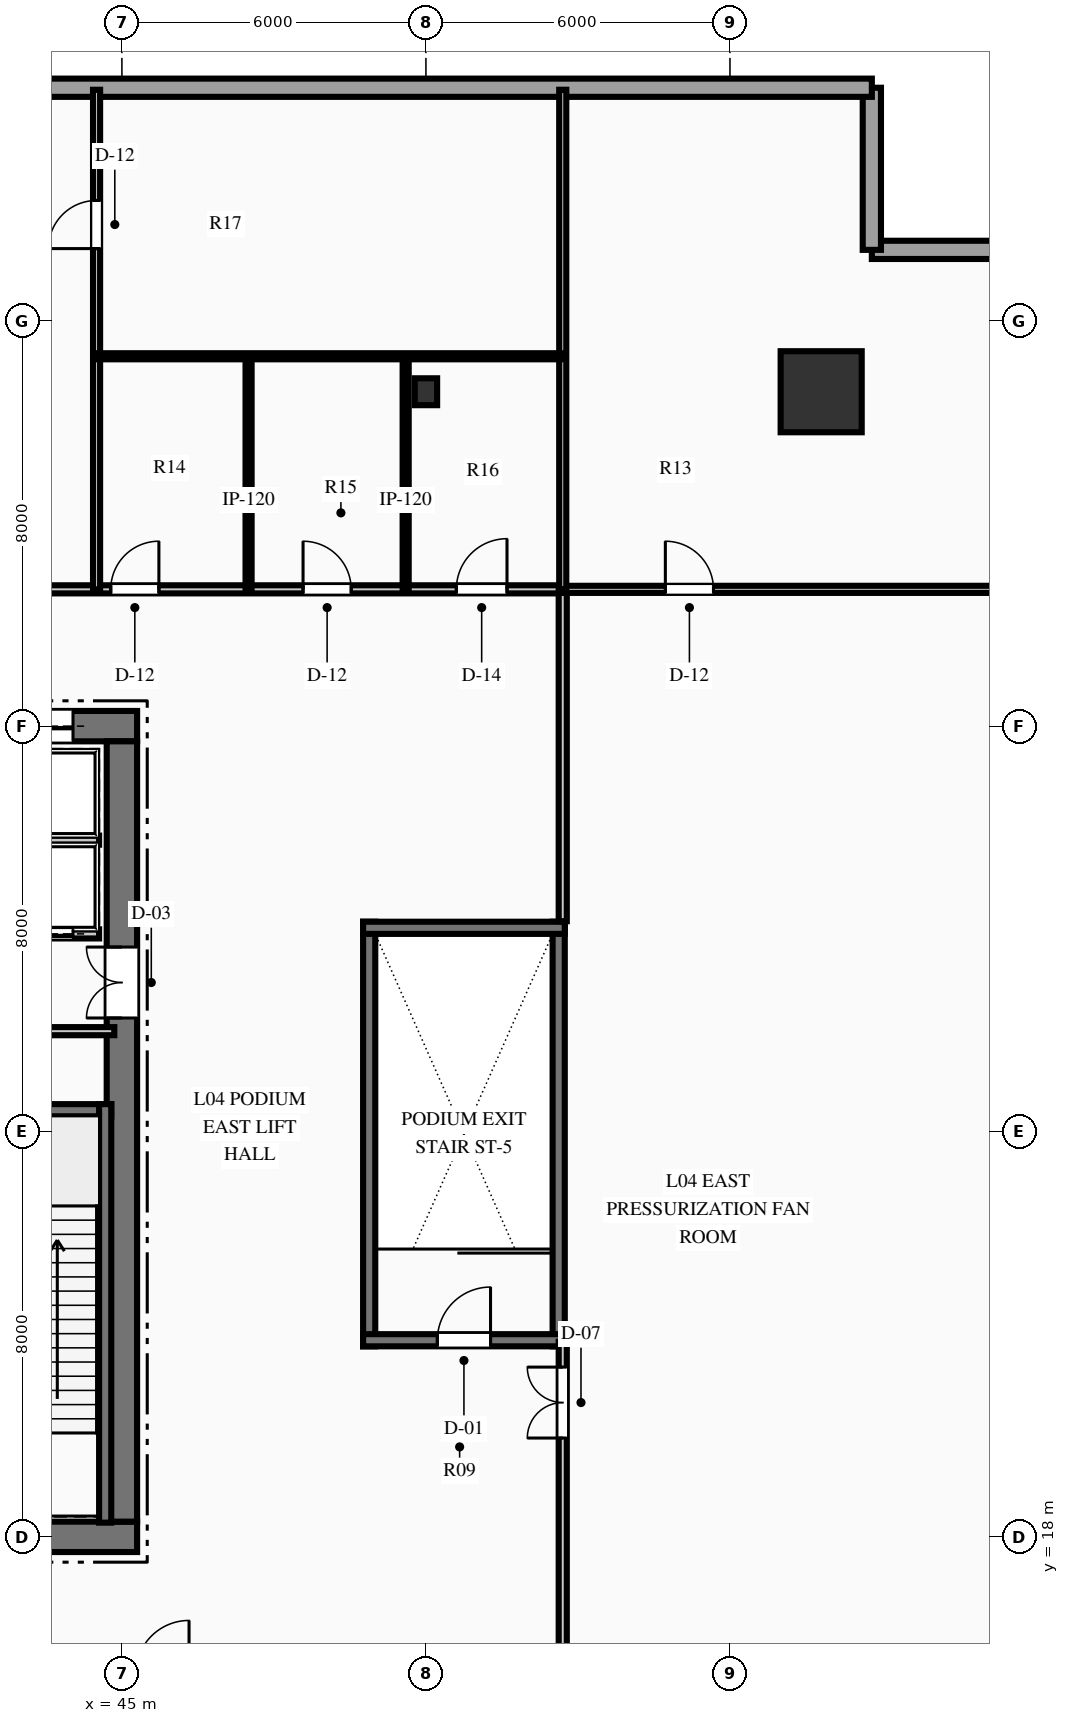
"""IFC4 building model, lengths in metres.
Left out: names, types, materials, properties, quantities, classifications, styles, units other than length and angle.
Written with IfcOpenShell. Run it as: python <this file> out.ifc"""

import sys

from ifc_helpers import new_model, si_unit, direction, frame, frame_2d, origin, origin_2d, place, context, subcontext, project, spatial, rectangle, hollow_rectangle, i_section, extrude, element, fill, save


model = new_model("IFC4")
c1 = context("Model", 3, precision=1e-05, world=origin(), true_north=direction((0.0, 1.0)))
c2 = subcontext(c1, "Body", "Model", "MODEL_VIEW")
j1 = project(units=[si_unit("LENGTHUNIT", "METRE"), si_unit("PLANEANGLEUNIT", "RADIAN")], contexts=[c1])
p1 = place(None, origin())
s1 = spatial("IfcSite", under=j1, at=p1, CompositionType="ELEMENT")
p2 = place(p1, origin())
s2 = spatial("IfcBuilding", under=s1, at=p2, CompositionType="ELEMENT")
p3 = place(p2, frame((0.0, 0.0, 22.2)))
s3 = spatial("IfcBuildingStorey", under=s2, at=p3, CompositionType="ELEMENT", Elevation=22.2)
p4 = place(p3, frame((26.7, 18.0, 0.0), z_axis=(0.0, 0.0, 1.0), x_axis=(1.0, 0.0, 0.0)))
e1 = element("IfcWall", 1, at=p4, inside=s3, PredefinedType="SHEAR", context=c2, shape_type="SweptSolid", body=[
    extrude(rectangle(XDim=18.6, YDim=0.6, at=frame_2d((9.3, 0.0))), origin(), (0.0, 0.0, 1.0), 6.0),
])
p5 = place(p4, frame((7.4, 0.0, 0.0)))
e2 = element("IfcOpeningElement", 2, at=p5, cuts=e1, PredefinedType="OPENING", context=c2, shape_type="SweptSolid", body=[
    extrude(rectangle(XDim=1.1, YDim=2.15, at=frame_2d((0.55, 1.075))), frame((0.0, 0.31, 0.0), z_axis=(0.0, -1.0, 0.0), x_axis=(1.0, 0.0, 0.0)), (0.0, 0.0, 1.0), 0.62),
])
p6 = place(p4, frame((9.58, 0.0, 0.0)))
e3 = element("IfcOpeningElement", 3, at=p6, cuts=e1, PredefinedType="OPENING", context=c2, shape_type="SweptSolid", body=[
    extrude(rectangle(XDim=1.1, YDim=2.15, at=frame_2d((0.55, 1.075))), frame((0.0, 0.31, 0.0), z_axis=(0.0, -1.0, 0.0), x_axis=(1.0, 0.0, 0.0)), (0.0, 0.0, 1.0), 0.62),
])
p7 = place(p3, frame((26.7, 34.0, 0.0), z_axis=(0.0, 0.0, 1.0), x_axis=(1.0, 0.0, 0.0)))
e4 = element("IfcWall", 4, at=p7, inside=s3, PredefinedType="SHEAR", context=c2, shape_type="SweptSolid", body=[
    extrude(rectangle(XDim=18.6, YDim=0.6, at=frame_2d((9.3, 0.0))), origin(), (0.0, 0.0, 1.0), 6.0),
])
p8 = place(p7, frame((1.265, 0.0, 0.0)))
e5 = element("IfcOpeningElement", 5, at=p8, cuts=e4, PredefinedType="OPENING", context=c2, shape_type="SweptSolid", body=[
    extrude(rectangle(XDim=1.1, YDim=2.15, at=frame_2d((0.55, 1.075))), frame((0.0, 0.31, 0.0), z_axis=(0.0, -1.0, 0.0), x_axis=(1.0, 0.0, 0.0)), (0.0, 0.0, 1.0), 0.62),
])
p9 = place(p7, frame((3.515, 0.0, 0.0)))
e6 = element("IfcOpeningElement", 6, at=p9, cuts=e4, PredefinedType="OPENING", context=c2, shape_type="SweptSolid", body=[
    extrude(rectangle(XDim=1.1, YDim=2.15, at=frame_2d((0.55, 1.075))), frame((0.0, 0.31, 0.0), z_axis=(0.0, -1.0, 0.0), x_axis=(1.0, 0.0, 0.0)), (0.0, 0.0, 1.0), 0.62),
])
p10 = place(p7, frame((13.985, 0.0, 0.0)))
e7 = element("IfcOpeningElement", 7, at=p10, cuts=e4, PredefinedType="OPENING", context=c2, shape_type="SweptSolid", body=[
    extrude(rectangle(XDim=1.1, YDim=2.15, at=frame_2d((0.55, 1.075))), frame((0.0, 0.31, 0.0), z_axis=(0.0, -1.0, 0.0), x_axis=(1.0, 0.0, 0.0)), (0.0, 0.0, 1.0), 0.62),
])
p11 = place(p7, frame((16.235, 0.0, 0.0)))
e8 = element("IfcOpeningElement", 8, at=p11, cuts=e4, PredefinedType="OPENING", context=c2, shape_type="SweptSolid", body=[
    extrude(rectangle(XDim=1.1, YDim=2.15, at=frame_2d((0.55, 1.075))), frame((0.0, 0.31, 0.0), z_axis=(0.0, -1.0, 0.0), x_axis=(1.0, 0.0, 0.0)), (0.0, 0.0, 1.0), 0.62),
])
p12 = place(p3, frame((45.0, 18.3, 0.0), z_axis=(0.0, 0.0, 1.0), x_axis=(0.0, 1.0, 0.0)))
e9 = element("IfcWall", 9, at=p12, inside=s3, PredefinedType="SHEAR", context=c2, shape_type="SweptSolid", body=[
    extrude(rectangle(XDim=15.4, YDim=0.6, at=frame_2d((7.7, 0.0))), origin(), (0.0, 0.0, 1.0), 6.0),
])
p13 = place(p12, frame((9.94, 0.0, 0.0)))
e10 = element("IfcOpeningElement", 10, at=p13, cuts=e9, PredefinedType="OPENING", context=c2, shape_type="SweptSolid", body=[
    extrude(rectangle(XDim=1.4, YDim=2.2, at=frame_2d((0.7, 1.1))), frame((0.0, 0.31, 0.0), z_axis=(0.0, -1.0, 0.0), x_axis=(1.0, 0.0, 0.0)), (0.0, 0.0, 1.0), 0.62),
])
p14 = place(p3, frame((40.81, 26.42, 0.0), z_axis=(0.0, 0.0, 1.0), x_axis=(1.0, 0.0, 0.0)))
e11 = element("IfcWall", 11, at=p14, inside=s3, PredefinedType="SHEAR", context=c2, shape_type="SweptSolid", body=[
    extrude(rectangle(XDim=3.98, YDim=0.24, at=frame_2d((1.99, 0.0))), origin(), (0.0, 0.0, 1.0), 6.0),
])
p15 = place(p3, frame((44.67, 18.28, 0.0), z_axis=(0.0, 0.0, 1.0), x_axis=(0.0, 1.0, 0.0)))
e12 = element("IfcWall", 12, at=p15, inside=s3, PredefinedType="SHEAR", context=c2, shape_type="SweptSolid", body=[
    extrude(rectangle(XDim=8.26, YDim=0.24, at=frame_2d((4.13, 0.0))), origin(), (0.0, 0.0, 1.0), 6.0),
])
for number, where, z_axis, x_axis in (
    (13, (49.88, 21.76, 0.0), (0.0, 0.0, 1.0), (0.0, 1.0, 0.0)),
    (14, (53.62, 21.76, 0.0), (0.0, 0.0, 1.0), (0.0, 1.0, 0.0)),
):
    element("IfcWall", number, at=place(p3, frame(where, z_axis=z_axis, x_axis=x_axis)), inside=s3, PredefinedType="SHEAR", context=c2, shape_type="SweptSolid", body=[
        extrude(rectangle(XDim=8.38, YDim=0.24, at=frame_2d((4.19, 0.0))), origin(), (0.0, 0.0, 1.0), 6.0),
    ])
p16 = place(p3, frame((49.76, 21.88, 0.0), z_axis=(0.0, 0.0, 1.0), x_axis=(1.0, 0.0, 0.0)))
e15 = element("IfcWall", 15, at=p16, inside=s3, PredefinedType="SHEAR", context=c2, shape_type="SweptSolid", body=[
    extrude(rectangle(XDim=3.98, YDim=0.24, at=frame_2d((1.99, 0.0))), origin(), (0.0, 0.0, 1.0), 6.0),
])
p17 = place(p16, frame((1.465, 0.0, 0.0)))
e16 = element("IfcOpeningElement", 16, at=p17, cuts=e15, PredefinedType="OPENING", context=c2, shape_type="SweptSolid", body=[
    extrude(rectangle(XDim=1.05, YDim=2.15, at=frame_2d((0.525, 1.075))), frame((0.0, 0.13, 0.0), z_axis=(0.0, -1.0, 0.0), x_axis=(1.0, 0.0, 0.0)), (0.0, 0.0, 1.0), 0.26),
])
p18 = place(p3, frame((49.76, 30.02, 0.0), z_axis=(0.0, 0.0, 1.0), x_axis=(1.0, 0.0, 0.0)))
e17 = element("IfcWall", 17, at=p18, inside=s3, PredefinedType="SHEAR", context=c2, shape_type="SweptSolid", body=[
    extrude(rectangle(XDim=3.98, YDim=0.24, at=frame_2d((1.99, 0.0))), origin(), (0.0, 0.0, 1.0), 6.0),
])
p19 = place(p3, frame((58.8, 40.6, 0.0), z_axis=(0.0, 0.0, 1.0), x_axis=(1.0, 0.0, 0.0)))
e18 = element("IfcColumn", 18, at=p19, inside=s3, PredefinedType="COLUMN", context=c2, shape_type="SweptSolid", body=[
    extrude(hollow_rectangle(XDim=1.6, YDim=1.6, WallThickness=0.08, at=origin_2d()), origin(), (0.0, 0.0, 1.0), 6.0),
])
p20 = place(p3, frame((51.0, 40.6, 0.0), z_axis=(0.0, 0.0, 1.0), x_axis=(1.0, 0.0, 0.0)))
e19 = element("IfcColumn", 19, at=p20, inside=s3, PredefinedType="COLUMN", context=c2, shape_type="SweptSolid", body=[
    extrude(i_section(OverallWidth=0.442, OverallDepth=0.531, WebThickness=0.066, FlangeThickness=0.106, at=origin_2d()), origin(), (0.0, 0.0, 1.0), 6.0),
])
p21 = place(p3, frame((59.8, 43.4, 0.0), z_axis=(0.0, 0.0, 1.0), x_axis=(1.0, 0.0, 0.0)))
e20 = element("IfcWall", 20, at=p21, inside=s3, PredefinedType="STANDARD", context=c2, shape_type="SweptSolid", body=[
    extrude(rectangle(XDim=3.2, YDim=0.36, at=frame_2d((1.6, 0.0))), origin(), (0.0, 0.0, 1.0), 5.59),
])
p22 = place(p3, frame((59.8, 46.6, 0.0), z_axis=(0.0, 0.0, 1.0), x_axis=(0.0, -1.0, 0.0)))
e21 = element("IfcWall", 21, at=p22, inside=s3, PredefinedType="STANDARD", context=c2, shape_type="SweptSolid", body=[
    extrude(rectangle(XDim=3.2, YDim=0.36, at=frame_2d((1.6, 0.0))), origin(), (0.0, 0.0, 1.0), 5.59),
])
p23 = place(p3, frame((12.2, 46.6, 0.0), z_axis=(0.0, 0.0, 1.0), x_axis=(1.0, 0.0, 0.0)))
e22 = element("IfcWall", 22, at=p23, inside=s3, PredefinedType="STANDARD", context=c2, shape_type="SweptSolid", body=[
    extrude(rectangle(XDim=47.6, YDim=0.36, at=frame_2d((23.8, 0.0))), origin(), (0.0, 0.0, 1.0), 5.59),
])
p24 = place(p3, frame((40.8, 27.98, 0.0), z_axis=(0.0, 0.0, 1.0), x_axis=(1.0, 0.0, 0.0)))
e23 = element("IfcWall", 23, at=p24, inside=s3, PredefinedType="PARTITIONING", context=c2, shape_type="SweptSolid", body=[
    extrude(rectangle(XDim=4.05, YDim=0.16, at=frame_2d((2.025, 0.0))), origin(), (0.0, 0.0, 1.0), 5.59),
])
p25 = place(p24, frame((1.475, 0.0, 0.0)))
e24 = element("IfcOpeningElement", 24, at=p25, cuts=e23, PredefinedType="OPENING", context=c2, shape_type="SweptSolid", body=[
    extrude(rectangle(XDim=0.95, YDim=2.15, at=frame_2d((0.475, 1.075))), frame((0.0, 0.09, 0.0), z_axis=(0.0, -1.0, 0.0), x_axis=(1.0, 0.0, 0.0)), (0.0, 0.0, 1.0), 0.18),
])
p26 = place(p3, frame((40.12, 29.9, 0.0), z_axis=(0.0, 0.0, 1.0), x_axis=(1.0, 0.0, 0.0)))
e25 = element("IfcWall", 25, at=p26, inside=s3, PredefinedType="PARTITIONING", context=c2, shape_type="SweptSolid", body=[
    extrude(rectangle(XDim=4.43, YDim=0.18, at=frame_2d((2.215, 0.0))), origin(), (0.0, 0.0, 1.0), 5.59),
])
p27 = place(p26, frame((0.565, 0.0, 0.0)))
e26 = element("IfcOpeningElement", 26, at=p27, cuts=e25, PredefinedType="OPENING", context=c2, shape_type="SweptSolid", body=[
    extrude(rectangle(XDim=1.1, YDim=2.15, at=frame_2d((0.55, 1.075))), frame((0.0, 0.1, 0.0), z_axis=(0.0, -1.0, 0.0), x_axis=(1.0, 0.0, 0.0)), (0.0, 0.0, 1.0), 0.2),
])
p28 = place(p26, frame((2.815, 0.0, 0.0)))
e27 = element("IfcOpeningElement", 27, at=p28, cuts=e25, PredefinedType="OPENING", context=c2, shape_type="SweptSolid", body=[
    extrude(rectangle(XDim=1.1, YDim=2.15, at=frame_2d((0.55, 1.075))), frame((0.0, 0.1, 0.0), z_axis=(0.0, -1.0, 0.0), x_axis=(1.0, 0.0, 0.0)), (0.0, 0.0, 1.0), 0.2),
])
p29 = place(p3, frame((40.12, 31.75, 0.0), z_axis=(0.0, 0.0, 1.0), x_axis=(1.0, 0.0, 0.0)))
e28 = element("IfcWall", 28, at=p29, inside=s3, PredefinedType="PARTITIONING", context=c2, shape_type="SweptSolid", body=[
    extrude(rectangle(XDim=4.43, YDim=0.18, at=frame_2d((2.215, 0.0))), origin(), (0.0, 0.0, 1.0), 5.59),
])
p30 = place(p3, frame((18.3, 36.7, 0.0), z_axis=(0.0, 0.0, 1.0), x_axis=(1.0, 0.0, 0.0)))
e29 = element("IfcWall", 29, at=p30, inside=s3, PredefinedType="PARTITIONING", context=c2, shape_type="SweptSolid", body=[
    extrude(rectangle(XDim=35.4, YDim=0.16, at=frame_2d((17.7, 0.0))), origin(), (0.0, 0.0, 1.0), 5.59),
])
p31 = place(p30, frame((5.57, 0.0, 0.0)))
e30 = element("IfcOpeningElement", 30, at=p31, cuts=e29, PredefinedType="OPENING", context=c2, shape_type="SweptSolid", body=[
    extrude(rectangle(XDim=1.05, YDim=2.15, at=frame_2d((0.525, 1.075))), frame((0.0, 0.09, 0.0), z_axis=(0.0, -1.0, 0.0), x_axis=(1.0, 0.0, 0.0)), (0.0, 0.0, 1.0), 0.18),
])
p32 = place(p30, frame((17.225, 0.0, 0.0)))
e31 = element("IfcOpeningElement", 31, at=p32, cuts=e29, PredefinedType="OPENING", context=c2, shape_type="SweptSolid", body=[
    extrude(rectangle(XDim=1.05, YDim=2.15, at=frame_2d((0.525, 1.075))), frame((0.0, 0.09, 0.0), z_axis=(0.0, -1.0, 0.0), x_axis=(1.0, 0.0, 0.0)), (0.0, 0.0, 1.0), 0.18),
])
p33 = place(p30, frame((26.48, 0.0, 0.0)))
e32 = element("IfcOpeningElement", 32, at=p33, cuts=e29, PredefinedType="OPENING", context=c2, shape_type="SweptSolid", body=[
    extrude(rectangle(XDim=0.95, YDim=2.15, at=frame_2d((0.475, 1.075))), frame((0.0, 0.09, 0.0), z_axis=(0.0, -1.0, 0.0), x_axis=(1.0, 0.0, 0.0)), (0.0, 0.0, 1.0), 0.18),
])
p34 = place(p30, frame((30.275, 0.0, 0.0)))
e33 = element("IfcOpeningElement", 33, at=p34, cuts=e29, PredefinedType="OPENING", context=c2, shape_type="SweptSolid", body=[
    extrude(rectangle(XDim=0.95, YDim=2.15, at=frame_2d((0.475, 1.075))), frame((0.0, 0.09, 0.0), z_axis=(0.0, -1.0, 0.0), x_axis=(1.0, 0.0, 0.0)), (0.0, 0.0, 1.0), 0.18),
])
p35 = place(p30, frame((33.3, 0.0, 0.0)))
e34 = element("IfcOpeningElement", 34, at=p35, cuts=e29, PredefinedType="OPENING", context=c2, shape_type="SweptSolid", body=[
    extrude(rectangle(XDim=1.0, YDim=2.15, at=frame_2d((0.5, 1.075))), frame((0.0, 0.09, 0.0), z_axis=(0.0, -1.0, 0.0), x_axis=(1.0, 0.0, 0.0)), (0.0, 0.0, 1.0), 0.18),
])
p36 = place(p3, frame((53.7, 15.3, 0.0), z_axis=(0.0, 0.0, 1.0), x_axis=(0.0, 1.0, 0.0)))
e35 = element("IfcWall", 35, at=p36, inside=s3, PredefinedType="PARTITIONING", context=c2, shape_type="SweptSolid", body=[
    extrude(rectangle(XDim=6.55, YDim=0.16, at=frame_2d((3.275, 0.0))), origin(), (0.0, 0.0, 1.0), 5.59),
])
p37 = place(p36, frame((4.65, 0.0, 0.0)))
e36 = element("IfcOpeningElement", 36, at=p37, cuts=e35, PredefinedType="OPENING", context=c2, shape_type="SweptSolid", body=[
    extrude(rectangle(XDim=1.4, YDim=2.2, at=frame_2d((0.7, 1.1))), frame((0.0, 0.09, 0.0), z_axis=(0.0, -1.0, 0.0), x_axis=(1.0, 0.0, 0.0)), (0.0, 0.0, 1.0), 0.18),
])
p38 = place(p3, frame((53.7, 30.15, 0.0), z_axis=(0.0, 0.0, 1.0), x_axis=(0.0, 1.0, 0.0)))
e37 = element("IfcWall", 37, at=p38, inside=s3, PredefinedType="PARTITIONING", context=c2, shape_type="SweptSolid", body=[
    extrude(rectangle(XDim=6.55, YDim=0.16, at=frame_2d((3.275, 0.0))), origin(), (0.0, 0.0, 1.0), 5.59),
])
p39 = place(p3, frame((53.7, 36.7, 0.0), z_axis=(0.0, 0.0, 1.0), x_axis=(1.0, 0.0, 0.0)))
e38 = element("IfcWall", 38, at=p39, inside=s3, PredefinedType="PARTITIONING", context=c2, shape_type="SweptSolid", body=[
    extrude(rectangle(XDim=9.26, YDim=0.14, at=frame_2d((4.63, 0.0))), origin(), (0.0, 0.0, 1.0), 5.59),
])
p40 = place(p39, frame((2.025, 0.0, 0.0)))
e39 = element("IfcOpeningElement", 39, at=p40, cuts=e38, PredefinedType="OPENING", context=c2, shape_type="SweptSolid", body=[
    extrude(rectangle(XDim=0.95, YDim=2.15, at=frame_2d((0.475, 1.075))), frame((0.0, 0.08, 0.0), z_axis=(0.0, -1.0, 0.0), x_axis=(1.0, 0.0, 0.0)), (0.0, 0.0, 1.0), 0.16),
])
p41 = place(p3, frame((44.5, 36.7, 0.0), z_axis=(0.0, 0.0, 1.0), x_axis=(0.0, 1.0, 0.0)))
e40 = element("IfcWall", 40, at=p41, inside=s3, PredefinedType="PARTITIONING", context=c2, shape_type="SweptSolid", body=[
    extrude(rectangle(XDim=9.86, YDim=0.14, at=frame_2d((4.93, 0.0))), origin(), (0.0, 0.0, 1.0), 5.59),
])
p42 = place(p41, frame((6.725, 0.0, 0.0)))
e41 = element("IfcOpeningElement", 41, at=p42, cuts=e40, PredefinedType="OPENING", context=c2, shape_type="SweptSolid", body=[
    extrude(rectangle(XDim=0.95, YDim=2.15, at=frame_2d((0.475, 1.075))), frame((0.0, 0.08, 0.0), z_axis=(0.0, -1.0, 0.0), x_axis=(1.0, 0.0, 0.0)), (0.0, 0.0, 1.0), 0.16),
])
p43 = place(p3, frame((53.7, 36.7, 0.0), z_axis=(0.0, 0.0, 1.0), x_axis=(0.0, 1.0, 0.0)))
e42 = element("IfcWall", 42, at=p43, inside=s3, PredefinedType="PARTITIONING", context=c2, shape_type="SweptSolid", body=[
    extrude(rectangle(XDim=9.86, YDim=0.14, at=frame_2d((4.93, 0.0))), origin(), (0.0, 0.0, 1.0), 5.59),
])
for number, where, z_axis, x_axis in (
    (43, (47.5, 36.7, 0.0), (0.0, 0.0, 1.0), (0.0, 1.0, 0.0)),
    (44, (50.6, 36.7, 0.0), (0.0, 0.0, 1.0), (0.0, 1.0, 0.0)),
):
    element("IfcWall", number, at=place(p3, frame(where, z_axis=z_axis, x_axis=x_axis)), inside=s3, PredefinedType="PARTITIONING", context=c2, shape_type="SweptSolid", body=[
        extrude(rectangle(XDim=4.6, YDim=0.12, at=frame_2d((2.3, 0.0))), origin(), (0.0, 0.0, 1.0), 5.59),
    ])
p44 = place(p3, frame((44.5, 41.3, 0.0), z_axis=(0.0, 0.0, 1.0), x_axis=(1.0, 0.0, 0.0)))
e45 = element("IfcWall", 45, at=p44, inside=s3, PredefinedType="PARTITIONING", context=c2, shape_type="SweptSolid", body=[
    extrude(rectangle(XDim=9.2, YDim=0.12, at=frame_2d((4.6, 0.0))), origin(), (0.0, 0.0, 1.0), 5.59),
])
p45 = place(p13, origin())
e46 = element("IfcDoor", 46, at=p45, inside=s3, OperationType="DOUBLE_DOOR_SINGLE_SWING", PredefinedType="DOOR", context=c2, shape_type="SweptSolid", body=[
    extrude(rectangle(XDim=1.4, YDim=2.2, at=frame_2d((0.7, 1.1))), frame((0.0, 0.025, 0.0), z_axis=(0.0, -1.0, 0.0), x_axis=(1.0, 0.0, 0.0)), (0.0, 0.0, 1.0), 0.05),
])
fill(e10, e46)
p46 = place(p17, origin())
e47 = element("IfcDoor", 47, at=p46, inside=s3, OperationType="SINGLE_SWING_RIGHT", PredefinedType="DOOR", context=c2, shape_type="SweptSolid", body=[
    extrude(rectangle(XDim=1.05, YDim=2.15, at=frame_2d((0.525, 1.075))), frame((0.0, 0.025, 0.0), z_axis=(0.0, -1.0, 0.0), x_axis=(1.0, 0.0, 0.0)), (0.0, 0.0, 1.0), 0.05),
])
fill(e16, e47)
p47 = place(p37, origin())
e48 = element("IfcDoor", 48, at=p47, inside=s3, OperationType="DOUBLE_DOOR_SINGLE_SWING", PredefinedType="DOOR", context=c2, shape_type="SweptSolid", body=[
    extrude(rectangle(XDim=1.4, YDim=2.2, at=frame_2d((0.7, 1.1))), frame((0.0, 0.025, 0.0), z_axis=(0.0, -1.0, 0.0), x_axis=(1.0, 0.0, 0.0)), (0.0, 0.0, 1.0), 0.05),
])
fill(e36, e48)
p48 = place(p42, origin())
e49 = element("IfcDoor", 49, at=p48, inside=s3, OperationType="SINGLE_SWING_LEFT", PredefinedType="DOOR", context=c2, shape_type="SweptSolid", body=[
    extrude(rectangle(XDim=0.95, YDim=2.15, at=frame_2d((0.475, 1.075))), frame((0.0, 0.025, 0.0), z_axis=(0.0, -1.0, 0.0), x_axis=(1.0, 0.0, 0.0)), (0.0, 0.0, 1.0), 0.05),
])
fill(e41, e49)
p49 = place(p33, origin())
e50 = element("IfcDoor", 50, at=p49, inside=s3, OperationType="SINGLE_SWING_RIGHT", PredefinedType="DOOR", context=c2, shape_type="SweptSolid", body=[
    extrude(rectangle(XDim=0.95, YDim=2.15, at=frame_2d((0.475, 1.075))), frame((0.0, 0.025, 0.0), z_axis=(0.0, -1.0, 0.0), x_axis=(1.0, 0.0, 0.0)), (0.0, 0.0, 1.0), 0.05),
])
fill(e32, e50)
p50 = place(p34, origin())
e51 = element("IfcDoor", 51, at=p50, inside=s3, OperationType="SINGLE_SWING_LEFT", PredefinedType="DOOR", context=c2, shape_type="SweptSolid", body=[
    extrude(rectangle(XDim=0.95, YDim=2.15, at=frame_2d((0.475, 1.075))), frame((0.0, 0.025, 0.0), z_axis=(0.0, -1.0, 0.0), x_axis=(1.0, 0.0, 0.0)), (0.0, 0.0, 1.0), 0.05),
])
fill(e33, e51)
p51 = place(p35, origin())
e52 = element("IfcDoor", 52, at=p51, inside=s3, OperationType="SINGLE_SWING_RIGHT", PredefinedType="DOOR", context=c2, shape_type="SweptSolid", body=[
    extrude(rectangle(XDim=1.0, YDim=2.15, at=frame_2d((0.5, 1.075))), frame((0.0, 0.025, 0.0), z_axis=(0.0, -1.0, 0.0), x_axis=(1.0, 0.0, 0.0)), (0.0, 0.0, 1.0), 0.05),
])
fill(e34, e52)
p52 = place(p40, origin())
e53 = element("IfcDoor", 53, at=p52, inside=s3, OperationType="SINGLE_SWING_LEFT", PredefinedType="DOOR", context=c2, shape_type="SweptSolid", body=[
    extrude(rectangle(XDim=0.95, YDim=2.15, at=frame_2d((0.475, 1.075))), frame((0.0, 0.025, 0.0), z_axis=(0.0, -1.0, 0.0), x_axis=(1.0, 0.0, 0.0)), (0.0, 0.0, 1.0), 0.05),
])
fill(e39, e53)
p53 = place(p28, origin())
e54 = element("IfcDoor", 54, at=p53, inside=s3, OperationType="SLIDING_TO_LEFT", PredefinedType="DOOR", context=c2, shape_type="SweptSolid", body=[
    extrude(rectangle(XDim=1.1, YDim=2.15, at=frame_2d((0.55, 1.075))), frame((0.0, 0.025, 0.0), z_axis=(0.0, -1.0, 0.0), x_axis=(1.0, 0.0, 0.0)), (0.0, 0.0, 1.0), 0.05),
])
fill(e27, e54)
p54 = place(p11, origin())
e55 = element("IfcDoor", 55, at=p54, inside=s3, OperationType="SLIDING_TO_LEFT", PredefinedType="DOOR", context=c2, shape_type="SweptSolid", body=[
    extrude(rectangle(XDim=1.1, YDim=2.15, at=frame_2d((0.55, 1.075))), frame((0.0, 0.025, 0.0), z_axis=(0.0, -1.0, 0.0), x_axis=(1.0, 0.0, 0.0)), (0.0, 0.0, 1.0), 0.05),
])
fill(e8, e55)
save(model, sys.argv[1])
